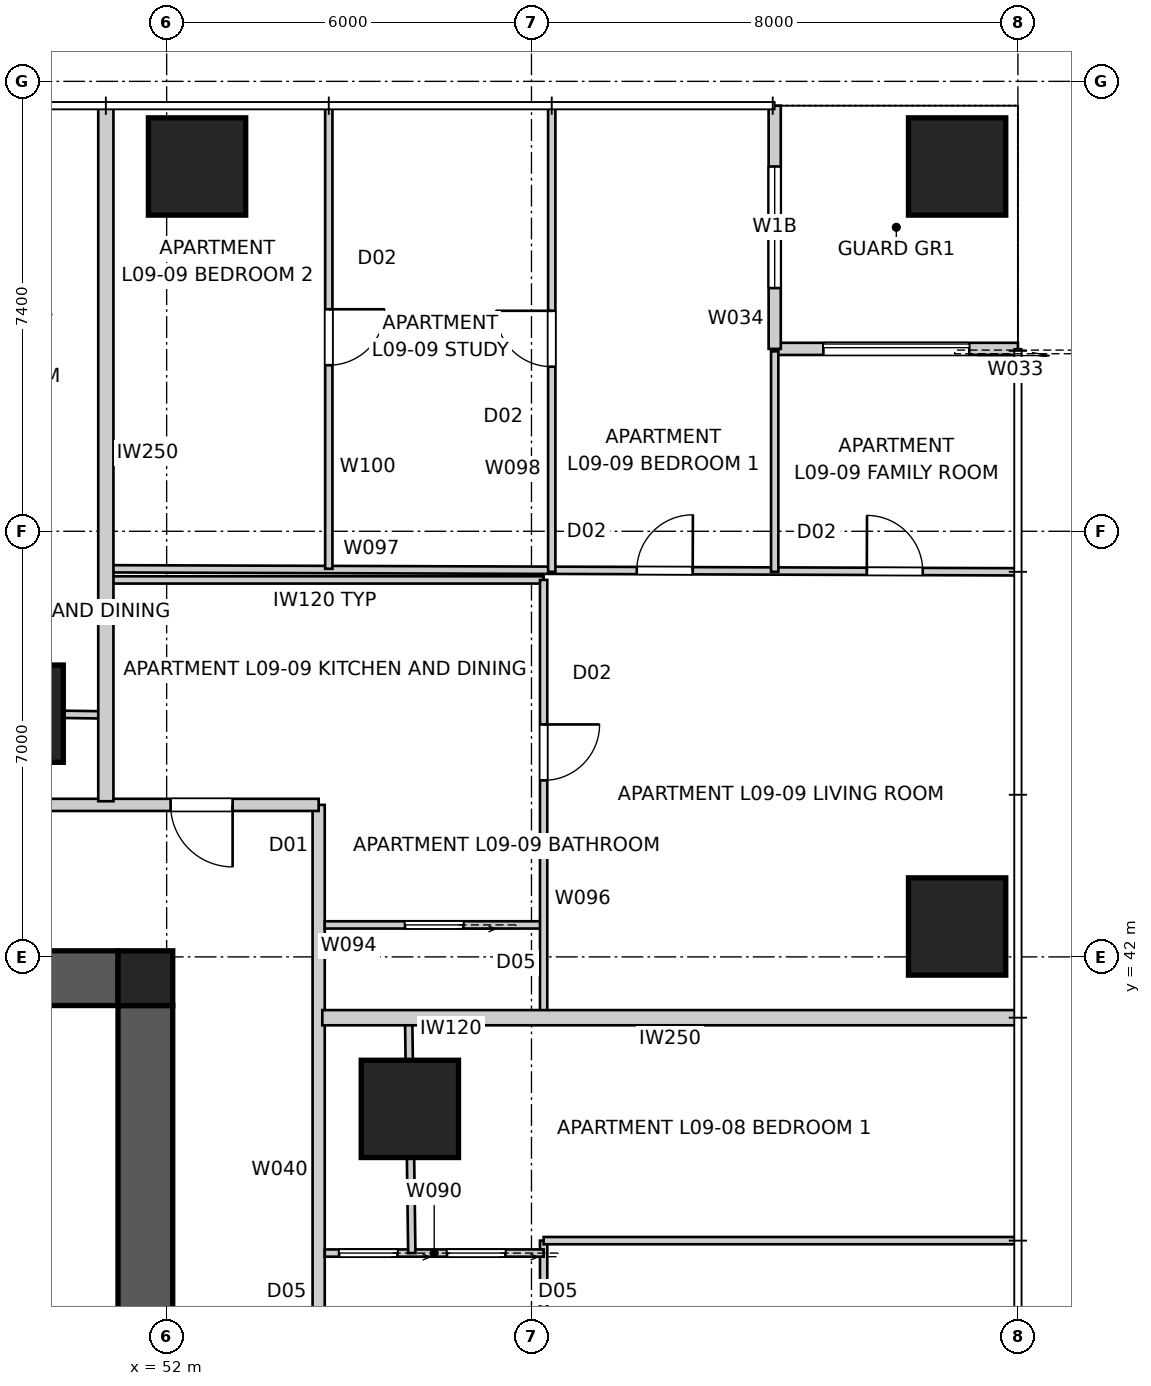
"""IFC4 building model, lengths in metres.
Left out: names, types, materials, properties, quantities, classifications, styles, units other than length and angle.
Written with IfcOpenShell. Run it as: python <this file> out.ifc"""

import sys

from ifc_helpers import new_model, si_unit, direction, frame, frame_2d, origin, origin_2d, place, context, subcontext, project, spatial, polyline, rectangle, outline, extrude, element, fill, save


model = new_model("IFC4")
c1 = context("Model", 3, precision=1e-05, world=origin(), true_north=direction((0.0, 1.0)))
c2 = subcontext(c1, "Body", "Model", "MODEL_VIEW")
j1 = project(units=[si_unit("LENGTHUNIT", "METRE"), si_unit("PLANEANGLEUNIT", "RADIAN")], contexts=[c1])
p1 = place(None, origin())
s1 = spatial("IfcSite", under=j1, at=p1, CompositionType="ELEMENT")
p2 = place(p1, origin())
s2 = spatial("IfcBuilding", under=s1, at=p2, CompositionType="ELEMENT")
p3 = place(p2, frame((0.0, 0.0, 35.4)))
s3 = spatial("IfcBuildingStorey", under=s2, at=p3, CompositionType="ELEMENT", Elevation=35.4)
p4 = place(p3, frame((28.8, 41.65, 0.0), z_axis=(0.0, 0.0, 1.0), x_axis=(1.0, 0.0, 0.0)))
e1 = element("IfcWall", 1, at=p4, inside=s3, PredefinedType="SHEAR", context=c2, shape_type="SweptSolid", body=[
    extrude(outline(polyline([(0.0, -0.45), (22.4, -0.45), (22.4, -0.025), (22.85, -0.025), (22.85, 0.025), (22.4, 0.025), (22.4, 0.45), (0.0, 0.45), (0.0, 0.025), (-0.45, 0.025), (-0.45, -0.025), (0.0, -0.025), (0.0, -0.45)])), origin(), (0.0, 0.0, 1.0), 3.4),
])
p5 = place(p3, frame((51.65, 18.8, 0.0), z_axis=(0.0, 0.0, 1.0), x_axis=(0.0, 1.0, 0.0)))
e2 = element("IfcWall", 2, at=p5, inside=s3, PredefinedType="SHEAR", context=c2, shape_type="SweptSolid", body=[
    extrude(outline(polyline([(0.0, -0.45), (22.4, -0.45), (22.4, -0.025), (22.85, -0.025), (22.85, 0.025), (22.4, 0.025), (22.4, 0.45), (0.0, 0.45), (0.0, 0.025), (-0.45, 0.025), (-0.45, -0.025), (0.0, -0.025), (0.0, -0.45)])), origin(), (0.0, 0.0, 1.0), 3.4),
])
p6 = place(p5, frame((11.14, 0.0, 0.0)))
e3 = element("IfcOpeningElement", 3, at=p6, cuts=e2, PredefinedType="OPENING", context=c2, shape_type="SweptSolid", body=[
    extrude(rectangle(XDim=1.02, YDim=2.4, at=frame_2d((0.51, 1.2))), frame((0.0, 0.46, 0.0), z_axis=(0.0, -1.0, 0.0), x_axis=(1.0, 0.0, 0.0)), (0.0, 0.0, 1.0), 0.92),
])
p7 = place(p3, frame((51.65, 41.65, 0.0), z_axis=(0.0, 0.0, 1.0), x_axis=(1.0, 0.0, 0.0)))
e4 = element("IfcColumn", 4, at=p7, inside=s3, PredefinedType="COLUMN", context=c2, shape_type="SweptSolid", body=[
    extrude(rectangle(XDim=0.9, YDim=0.9, at=origin_2d()), origin(), (0.0, 0.0, 1.0), 3.4),
])
for number, where, z_axis, x_axis in (
    (5, (65.0, 42.5, 0.0), (0.0, 0.0, 1.0), (1.0, 0.0, 0.0)),
    (6, (65.0, 55.0, 0.0), (0.0, 0.0, 1.0), (1.0, 0.0, 0.0)),
    (7, (52.5, 55.0, 0.0), (0.0, 0.0, 1.0), (1.0, 0.0, 0.0)),
    (8, (56.0, 39.5, 0.0), (0.0, 0.0, 1.0), (1.0, 0.0, 0.0)),
    (9, (49.5, 46.0, 0.0), (0.0, 0.0, 1.0), (1.0, 0.0, 0.0)),
):
    element("IfcColumn", number, at=place(p3, frame(where, z_axis=z_axis, x_axis=x_axis)), inside=s3, PredefinedType="COLUMN", context=c2, shape_type="SweptSolid", body=[
        extrude(rectangle(XDim=1.6, YDim=1.6, at=origin_2d()), origin(), (0.0, 0.0, 1.0), 3.4),
    ])
p8 = place(p3, frame((66.0, 52.0, 0.0), z_axis=(0.0, 0.0, 1.0), x_axis=(-1.0, 0.0, 0.0)))
e10 = element("IfcWall", 10, at=p8, inside=s3, PredefinedType="SOLIDWALL", context=c2, shape_type="SweptSolid", body=[
    extrude(rectangle(XDim=4.0, YDim=0.2, at=frame_2d((2.0, 0.0))), origin(), (0.0, 0.0, 1.0), 3.25),
])
p9 = place(p8, frame((0.8, 0.0, 0.0)))
e11 = element("IfcOpeningElement", 11, at=p9, cuts=e10, PredefinedType="OPENING", context=c2, shape_type="SweptSolid", body=[
    extrude(rectangle(XDim=2.4, YDim=2.1, at=frame_2d((1.2, 1.05))), frame((0.0, 0.11, 0.0), z_axis=(0.0, -1.0, 0.0), x_axis=(1.0, 0.0, 0.0)), (0.0, 0.0, 1.0), 0.22),
])
p10 = place(p3, frame((62.0, 52.0, 0.0), z_axis=(0.0, 0.0, 1.0), x_axis=(0.0, 1.0, 0.0)))
e12 = element("IfcWall", 12, at=p10, inside=s3, PredefinedType="SOLIDWALL", context=c2, shape_type="SweptSolid", body=[
    extrude(rectangle(XDim=4.0, YDim=0.2, at=frame_2d((2.0, 0.0))), origin(), (0.0, 0.0, 1.0), 3.25),
])
p11 = place(p10, frame((1.0, 0.0, 0.45)))
e13 = element("IfcOpeningElement", 13, at=p11, cuts=e12, PredefinedType="OPENING", context=c2, shape_type="SweptSolid", body=[
    extrude(rectangle(XDim=2.0, YDim=1.8, at=frame_2d((1.0, 0.9))), frame((0.0, 0.11, 0.0), z_axis=(0.0, -1.0, 0.0), x_axis=(1.0, 0.0, 0.0)), (0.0, 0.0, 1.0), 0.22),
])
p12 = place(p3, frame((54.5, 16.3, 0.0), z_axis=(0.0, 0.0, 1.0), x_axis=(0.0, 1.0, 0.0)))
e14 = element("IfcWall", 14, at=p12, inside=s3, PredefinedType="PARTITIONING", context=c2, shape_type="SweptSolid", body=[
    extrude(rectangle(XDim=28.2, YDim=0.2, at=frame_2d((14.1, 0.0))), origin(), (0.0, 0.0, 1.0), 3.25),
])
p13 = place(p12, frame((8.403, 0.0, 0.0)))
e15 = element("IfcOpeningElement", 15, at=p13, cuts=e14, PredefinedType="OPENING", context=c2, shape_type="SweptSolid", body=[
    extrude(rectangle(XDim=1.02, YDim=2.34, at=frame_2d((0.51, 1.17))), frame((0.0, 0.11, 0.0), z_axis=(0.0, -1.0, 0.0), x_axis=(1.0, 0.0, 0.0)), (0.0, 0.0, 1.0), 0.22),
])
p14 = place(p12, frame((15.16, 0.0, 0.0)))
e16 = element("IfcOpeningElement", 16, at=p14, cuts=e14, PredefinedType="OPENING", context=c2, shape_type="SweptSolid", body=[
    extrude(rectangle(XDim=1.02, YDim=2.34, at=frame_2d((0.51, 1.17))), frame((0.0, 0.11, 0.0), z_axis=(0.0, -1.0, 0.0), x_axis=(1.0, 0.0, 0.0)), (0.0, 0.0, 1.0), 0.22),
])
p15 = place(p3, frame((54.5, 44.5, 0.0), z_axis=(0.0, 0.0, 1.0), x_axis=(-1.0, 0.0, 0.0)))
e17 = element("IfcWall", 17, at=p15, inside=s3, PredefinedType="PARTITIONING", context=c2, shape_type="SweptSolid", body=[
    extrude(rectangle(XDim=28.2, YDim=0.2, at=frame_2d((14.1, 0.0))), origin(), (0.0, 0.0, 1.0), 3.25),
])
p16 = place(p15, frame((5.854, 0.0, 0.0)))
e18 = element("IfcOpeningElement", 18, at=p16, cuts=e17, PredefinedType="OPENING", context=c2, shape_type="SweptSolid", body=[
    extrude(rectangle(XDim=1.02, YDim=2.34, at=frame_2d((0.51, 1.17))), frame((0.0, 0.11, 0.0), z_axis=(0.0, -1.0, 0.0), x_axis=(1.0, 0.0, 0.0)), (0.0, 0.0, 1.0), 0.22),
])
p17 = place(p15, frame((18.518, 0.0, 0.0)))
e19 = element("IfcOpeningElement", 19, at=p17, cuts=e17, PredefinedType="OPENING", context=c2, shape_type="SweptSolid", body=[
    extrude(rectangle(XDim=1.02, YDim=2.34, at=frame_2d((0.51, 1.17))), frame((0.0, 0.11, 0.0), z_axis=(0.0, -1.0, 0.0), x_axis=(1.0, 0.0, 0.0)), (0.0, 0.0, 1.0), 0.22),
])
p18 = place(p15, frame((1.415, 0.0, 0.0)))
e20 = element("IfcOpeningElement", 20, at=p18, cuts=e17, PredefinedType="OPENING", context=c2, shape_type="SweptSolid", body=[
    extrude(rectangle(XDim=1.02, YDim=2.34, at=frame_2d((0.51, 1.17))), frame((0.0, 0.11, 0.0), z_axis=(0.0, -1.0, 0.0), x_axis=(1.0, 0.0, 0.0)), (0.0, 0.0, 1.0), 0.22),
])
for number, where, z_axis, x_axis in (
    (21, (66.0, 41.0, 0.0), (0.0, 0.0, 1.0), (-1.0, 0.0, 0.0)),
    (22, (51.0, 56.0, 0.0), (0.0, 0.0, 1.0), (0.0, -1.0, 0.0)),
):
    element("IfcWall", number, at=place(p3, frame(where, z_axis=z_axis, x_axis=x_axis)), inside=s3, PredefinedType="PARTITIONING", context=c2, shape_type="SweptSolid", body=[
        extrude(rectangle(XDim=11.44, YDim=0.25, at=frame_2d((5.72, 0.0))), origin(), (0.0, 0.0, 1.0), 3.25),
    ])
p19 = place(p3, frame((58.2, 37.333, 0.0), z_axis=(0.0, 0.0, 1.0), x_axis=(0.0, -1.0, 0.0)))
e23 = element("IfcWall", 23, at=p19, inside=s3, PredefinedType="PARTITIONING", context=c2, shape_type="SweptSolid", body=[
    extrude(rectangle(XDim=11.0, YDim=0.12, at=frame_2d((5.5, 0.0))), origin(), (0.0, 0.0, 1.0), 3.25),
])
p20 = place(p19, frame((5.015, 0.0, 0.0)))
e24 = element("IfcOpeningElement", 24, at=p20, cuts=e23, PredefinedType="OPENING", context=c2, shape_type="SweptSolid", body=[
    extrude(rectangle(XDim=0.92, YDim=2.34, at=frame_2d((0.46, 1.17))), frame((0.0, 0.07, 0.0), z_axis=(0.0, -1.0, 0.0), x_axis=(1.0, 0.0, 0.0)), (0.0, 0.0, 1.0), 0.14),
])
p21 = place(p19, frame((8.2, 0.0, 0.0)))
e25 = element("IfcOpeningElement", 25, at=p21, cuts=e23, PredefinedType="OPENING", context=c2, shape_type="SweptSolid", body=[
    extrude(rectangle(XDim=0.96, YDim=2.1, at=frame_2d((0.48, 1.05))), frame((0.0, 0.07, 0.0), z_axis=(0.0, -1.0, 0.0), x_axis=(1.0, 0.0, 0.0)), (0.0, 0.0, 1.0), 0.14),
])
p22 = place(p3, frame((58.2, 37.129, 0.0), z_axis=(0.0, 0.0, 1.0), x_axis=(-1.0, 0.0, 0.0)))
e26 = element("IfcWall", 26, at=p22, inside=s3, PredefinedType="PARTITIONING", context=c2, shape_type="SweptSolid", body=[
    extrude(rectangle(XDim=3.6, YDim=0.12, at=frame_2d((1.8, 0.0))), origin(), (0.0, 0.0, 1.0), 3.25),
])
p23 = place(p22, frame((0.629, 0.0, 0.0)))
e27 = element("IfcOpeningElement", 27, at=p23, cuts=e26, PredefinedType="OPENING", context=c2, shape_type="SweptSolid", body=[
    extrude(rectangle(XDim=0.96, YDim=2.1, at=frame_2d((0.48, 1.05))), frame((0.0, 0.07, 0.0), z_axis=(0.0, -1.0, 0.0), x_axis=(1.0, 0.0, 0.0)), (0.0, 0.0, 1.0), 0.14),
])
p24 = place(p22, frame((2.404, 0.0, 0.0)))
e28 = element("IfcOpeningElement", 28, at=p24, cuts=e26, PredefinedType="OPENING", context=c2, shape_type="SweptSolid", body=[
    extrude(rectangle(XDim=0.96, YDim=2.1, at=frame_2d((0.48, 1.05))), frame((0.0, 0.07, 0.0), z_axis=(0.0, -1.0, 0.0), x_axis=(1.0, 0.0, 0.0)), (0.0, 0.0, 1.0), 0.14),
])
p25 = place(p3, frame((55.98, 41.0, 0.0), z_axis=(0.0, 0.0, 1.0), x_axis=(0.013494388256, -0.999908946597, 0.0)))
e29 = element("IfcWall", 29, at=p25, inside=s3, PredefinedType="PARTITIONING", context=c2, shape_type="SweptSolid", body=[
    extrude(rectangle(XDim=3.872, YDim=0.12, at=frame_2d((1.936, 0.0))), origin(), (0.0, 0.0, 1.0), 2.549),
])
p26 = place(p3, frame((65.96, 37.333, 0.0), z_axis=(0.0, 0.0, 1.0), x_axis=(-1.0, 0.0, 0.0)))
e30 = element("IfcWall", 30, at=p26, inside=s3, PredefinedType="PARTITIONING", context=c2, shape_type="SweptSolid", body=[
    extrude(rectangle(XDim=7.76, YDim=0.12, at=frame_2d((3.88, 0.0))), origin(), (0.0, 0.0, 1.0), 3.25),
])
p27 = place(p3, frame((58.2, 42.526, 0.0), z_axis=(0.0, 0.0, 1.0), x_axis=(-1.0, 0.0, 0.0)))
e31 = element("IfcWall", 31, at=p27, inside=s3, PredefinedType="PARTITIONING", context=c2, shape_type="SweptSolid", body=[
    extrude(rectangle(XDim=3.6, YDim=0.12, at=frame_2d((1.8, 0.0))), origin(), (0.0, 0.0, 1.0), 3.25),
])
p28 = place(p27, frame((1.32, 0.0, 0.0)))
e32 = element("IfcOpeningElement", 32, at=p28, cuts=e31, PredefinedType="OPENING", context=c2, shape_type="SweptSolid", body=[
    extrude(rectangle(XDim=0.96, YDim=2.1, at=frame_2d((0.48, 1.05))), frame((0.0, 0.07, 0.0), z_axis=(0.0, -1.0, 0.0), x_axis=(1.0, 0.0, 0.0)), (0.0, 0.0, 1.0), 0.14),
])
p29 = place(p3, frame((51.0, 48.2, 0.0), z_axis=(0.0, 0.0, 1.0), x_axis=(1.0, 0.0, 0.0)))
e33 = element("IfcWall", 33, at=p29, inside=s3, PredefinedType="PARTITIONING", context=c2, shape_type="SweptSolid", body=[
    extrude(rectangle(XDim=7.2, YDim=0.12, at=frame_2d((3.6, 0.0))), origin(), (0.0, 0.0, 1.0), 3.25),
])
p30 = place(p3, frame((58.2, 48.2, 0.0), z_axis=(0.0, 0.0, 1.0), x_axis=(0.0, -1.0, 0.0)))
e34 = element("IfcWall", 34, at=p30, inside=s3, PredefinedType="PARTITIONING", context=c2, shape_type="SweptSolid", body=[
    extrude(rectangle(XDim=7.2, YDim=0.12, at=frame_2d((3.6, 0.0))), origin(), (0.0, 0.0, 1.0), 3.25),
])
p31 = place(p30, frame((2.377, 0.0, 0.0)))
e35 = element("IfcOpeningElement", 35, at=p31, cuts=e34, PredefinedType="OPENING", context=c2, shape_type="SweptSolid", body=[
    extrude(rectangle(XDim=0.92, YDim=2.34, at=frame_2d((0.46, 1.17))), frame((0.0, 0.07, 0.0), z_axis=(0.0, -1.0, 0.0), x_axis=(1.0, 0.0, 0.0)), (0.0, 0.0, 1.0), 0.14),
])
p32 = place(p3, frame((51.0, 48.383, 0.0), z_axis=(0.0, 0.0, 1.0), x_axis=(0.9999944038, -0.003345499915, 0.0)))
e36 = element("IfcWall", 36, at=p32, inside=s3, PredefinedType="PARTITIONING", context=c2, shape_type="SweptSolid", body=[
    extrude(rectangle(XDim=14.96, YDim=0.12, at=frame_2d((7.48, 0.0))), origin(), (0.0, 0.0, 1.0), 3.25),
])
p33 = place(p32, frame((12.515, 0.0, 0.0)))
e37 = element("IfcOpeningElement", 37, at=p33, cuts=e36, PredefinedType="OPENING", context=c2, shape_type="SweptSolid", body=[
    extrude(rectangle(XDim=0.92, YDim=2.34, at=frame_2d((0.46, 1.17))), frame((0.0, 0.07, 0.0), z_axis=(0.0, -1.0, 0.0), x_axis=(1.0, 0.0, 0.0)), (0.0, 0.0, 1.0), 0.14),
])
p34 = place(p32, frame((8.732, 0.0, 0.0)))
e38 = element("IfcOpeningElement", 38, at=p34, cuts=e36, PredefinedType="OPENING", context=c2, shape_type="SweptSolid", body=[
    extrude(rectangle(XDim=0.92, YDim=2.34, at=frame_2d((0.46, 1.17))), frame((0.0, 0.07, 0.0), z_axis=(0.0, -1.0, 0.0), x_axis=(1.0, 0.0, 0.0)), (0.0, 0.0, 1.0), 0.14),
])
p35 = place(p3, frame((58.333, 48.333, 0.0), z_axis=(0.0, 0.0, 1.0), x_axis=(0.0, 1.0, 0.0)))
e39 = element("IfcWall", 39, at=p35, inside=s3, PredefinedType="PARTITIONING", context=c2, shape_type="SweptSolid", body=[
    extrude(rectangle(XDim=7.627, YDim=0.12, at=frame_2d((3.813, 0.0))), origin(), (0.0, 0.0, 1.0), 3.25),
])
p36 = place(p35, frame((3.373, 0.0, 0.0)))
e40 = element("IfcOpeningElement", 40, at=p36, cuts=e39, PredefinedType="OPENING", context=c2, shape_type="SweptSolid", body=[
    extrude(rectangle(XDim=0.92, YDim=2.34, at=frame_2d((0.46, 1.17))), frame((0.0, 0.07, 0.0), z_axis=(0.0, -1.0, 0.0), x_axis=(1.0, 0.0, 0.0)), (0.0, 0.0, 1.0), 0.14),
])
p37 = place(p3, frame((62.0, 51.96, 0.0), z_axis=(0.0, 0.0, 1.0), x_axis=(0.0, -1.0, 0.0)))
e41 = element("IfcWall", 41, at=p37, inside=s3, PredefinedType="PARTITIONING", context=c2, shape_type="SweptSolid", body=[
    extrude(rectangle(XDim=3.627, YDim=0.12, at=frame_2d((1.813, 0.0))), origin(), (0.0, 0.0, 1.0), 3.25),
])
p38 = place(p3, frame((54.667, 55.96, 0.0), z_axis=(0.0, 0.0, 1.0), x_axis=(0.0, -1.0, 0.0)))
e42 = element("IfcWall", 42, at=p38, inside=s3, PredefinedType="PARTITIONING", context=c2, shape_type="SweptSolid", body=[
    extrude(rectangle(XDim=7.577, YDim=0.12, at=frame_2d((3.788, 0.0))), origin(), (0.0, 0.0, 1.0), 2.638),
])
p39 = place(p38, frame((3.308, 0.0, 0.0)))
e43 = element("IfcOpeningElement", 43, at=p39, cuts=e42, PredefinedType="OPENING", context=c2, shape_type="SweptSolid", body=[
    extrude(rectangle(XDim=0.92, YDim=2.34, at=frame_2d((0.46, 1.17))), frame((0.0, 0.07, 0.0), z_axis=(0.0, -1.0, 0.0), x_axis=(1.0, 0.0, 0.0)), (0.0, 0.0, 1.0), 0.14),
])
p40 = place(p3, frame((46.473, 46.041, 0.0), z_axis=(0.0, 0.0, 1.0), x_axis=(0.999909127846, -0.013480951408, 0.0)))
e44 = element("IfcWall", 44, at=p40, inside=s3, PredefinedType="PARTITIONING", context=c2, shape_type="SweptSolid", body=[
    extrude(rectangle(XDim=4.528, YDim=0.12, at=frame_2d((2.264, 0.0))), origin(), (0.0, 0.0, 1.0), 2.549),
])
p41 = place(p40, frame((1.204, 0.0, 0.0)))
e45 = element("IfcOpeningElement", 45, at=p41, cuts=e44, PredefinedType="OPENING", context=c2, shape_type="SweptSolid", body=[
    extrude(rectangle(XDim=0.92, YDim=2.34, at=frame_2d((0.46, 1.17))), frame((0.0, 0.07, 0.0), z_axis=(0.0, -1.0, 0.0), x_axis=(1.0, 0.0, 0.0)), (0.0, 0.0, 1.0), 0.14),
])
p42 = place(p9, origin())
e46 = element("IfcDoor", 46, at=p42, inside=s3, OperationType="SLIDING_TO_LEFT", PredefinedType="DOOR", context=c2, shape_type="SweptSolid", body=[
    extrude(rectangle(XDim=2.4, YDim=2.1, at=frame_2d((1.2, 1.05))), frame((0.0, 0.025, 0.0), z_axis=(0.0, -1.0, 0.0), x_axis=(1.0, 0.0, 0.0)), (0.0, 0.0, 1.0), 0.05),
])
fill(e11, e46)
p43 = place(p11, origin())
e47 = element("IfcWindow", 47, at=p43, inside=s3, PartitioningType="SINGLE_PANEL", PredefinedType="WINDOW", context=c2, shape_type="SweptSolid", body=[
    extrude(rectangle(XDim=2.0, YDim=1.8, at=frame_2d((1.0, 0.9))), frame((0.0, 0.03, 0.0), z_axis=(0.0, -1.0, 0.0), x_axis=(1.0, 0.0, 0.0)), (0.0, 0.0, 1.0), 0.06),
])
fill(e13, e47)
p44 = place(p18, origin())
e48 = element("IfcDoor", 48, at=p44, inside=s3, OperationType="SINGLE_SWING_LEFT", PredefinedType="DOOR", context=c2, shape_type="SweptSolid", body=[
    extrude(rectangle(XDim=1.02, YDim=2.34, at=frame_2d((0.51, 1.17))), frame((0.0, 0.025, 0.0), z_axis=(0.0, -1.0, 0.0), x_axis=(1.0, 0.0, 0.0)), (0.0, 0.0, 1.0), 0.05),
])
fill(e20, e48)
p45 = place(p31, origin())
e49 = element("IfcDoor", 49, at=p45, inside=s3, OperationType="SINGLE_SWING_LEFT", PredefinedType="DOOR", context=c2, shape_type="SweptSolid", body=[
    extrude(rectangle(XDim=0.92, YDim=2.34, at=frame_2d((0.46, 1.17))), frame((0.0, 0.025, 0.0), z_axis=(0.0, -1.0, 0.0), x_axis=(1.0, 0.0, 0.0)), (0.0, 0.0, 1.0), 0.05),
])
fill(e35, e49)
p46 = place(p28, origin())
e50 = element("IfcDoor", 50, at=p46, inside=s3, OperationType="SLIDING_TO_LEFT", PredefinedType="DOOR", context=c2, shape_type="SweptSolid", body=[
    extrude(rectangle(XDim=0.96, YDim=2.1, at=frame_2d((0.48, 1.05))), frame((0.0, 0.025, 0.0), z_axis=(0.0, -1.0, 0.0), x_axis=(1.0, 0.0, 0.0)), (0.0, 0.0, 1.0), 0.05),
])
fill(e32, e50)
p47 = place(p23, origin())
e51 = element("IfcDoor", 51, at=p47, inside=s3, OperationType="SLIDING_TO_LEFT", PredefinedType="DOOR", context=c2, shape_type="SweptSolid", body=[
    extrude(rectangle(XDim=0.96, YDim=2.1, at=frame_2d((0.48, 1.05))), frame((0.0, 0.025, 0.0), z_axis=(0.0, -1.0, 0.0), x_axis=(1.0, 0.0, 0.0)), (0.0, 0.0, 1.0), 0.05),
])
fill(e27, e51)
p48 = place(p24, origin())
e52 = element("IfcDoor", 52, at=p48, inside=s3, OperationType="SLIDING_TO_LEFT", PredefinedType="DOOR", context=c2, shape_type="SweptSolid", body=[
    extrude(rectangle(XDim=0.96, YDim=2.1, at=frame_2d((0.48, 1.05))), frame((0.0, 0.025, 0.0), z_axis=(0.0, -1.0, 0.0), x_axis=(1.0, 0.0, 0.0)), (0.0, 0.0, 1.0), 0.05),
])
fill(e28, e52)
p49 = place(p33, origin())
e53 = element("IfcDoor", 53, at=p49, inside=s3, OperationType="SINGLE_SWING_LEFT", PredefinedType="DOOR", context=c2, shape_type="SweptSolid", body=[
    extrude(rectangle(XDim=0.92, YDim=2.34, at=frame_2d((0.46, 1.17))), frame((0.0, 0.025, 0.0), z_axis=(0.0, -1.0, 0.0), x_axis=(1.0, 0.0, 0.0)), (0.0, 0.0, 1.0), 0.05),
])
fill(e37, e53)
p50 = place(p34, origin())
e54 = element("IfcDoor", 54, at=p50, inside=s3, OperationType="SINGLE_SWING_RIGHT", PredefinedType="DOOR", context=c2, shape_type="SweptSolid", body=[
    extrude(rectangle(XDim=0.92, YDim=2.34, at=frame_2d((0.46, 1.17))), frame((0.0, 0.025, 0.0), z_axis=(0.0, -1.0, 0.0), x_axis=(1.0, 0.0, 0.0)), (0.0, 0.0, 1.0), 0.05),
])
fill(e38, e54)
p51 = place(p36, origin())
e55 = element("IfcDoor", 55, at=p51, inside=s3, OperationType="SINGLE_SWING_RIGHT", PredefinedType="DOOR", context=c2, shape_type="SweptSolid", body=[
    extrude(rectangle(XDim=0.92, YDim=2.34, at=frame_2d((0.46, 1.17))), frame((0.0, 0.025, 0.0), z_axis=(0.0, -1.0, 0.0), x_axis=(1.0, 0.0, 0.0)), (0.0, 0.0, 1.0), 0.05),
])
fill(e40, e55)
p52 = place(p39, origin())
e56 = element("IfcDoor", 56, at=p52, inside=s3, OperationType="SINGLE_SWING_LEFT", PredefinedType="DOOR", context=c2, shape_type="SweptSolid", body=[
    extrude(rectangle(XDim=0.92, YDim=2.34, at=frame_2d((0.46, 1.17))), frame((0.0, 0.025, 0.0), z_axis=(0.0, -1.0, 0.0), x_axis=(1.0, 0.0, 0.0)), (0.0, 0.0, 1.0), 0.05),
])
fill(e43, e56)
save(model, sys.argv[1])
